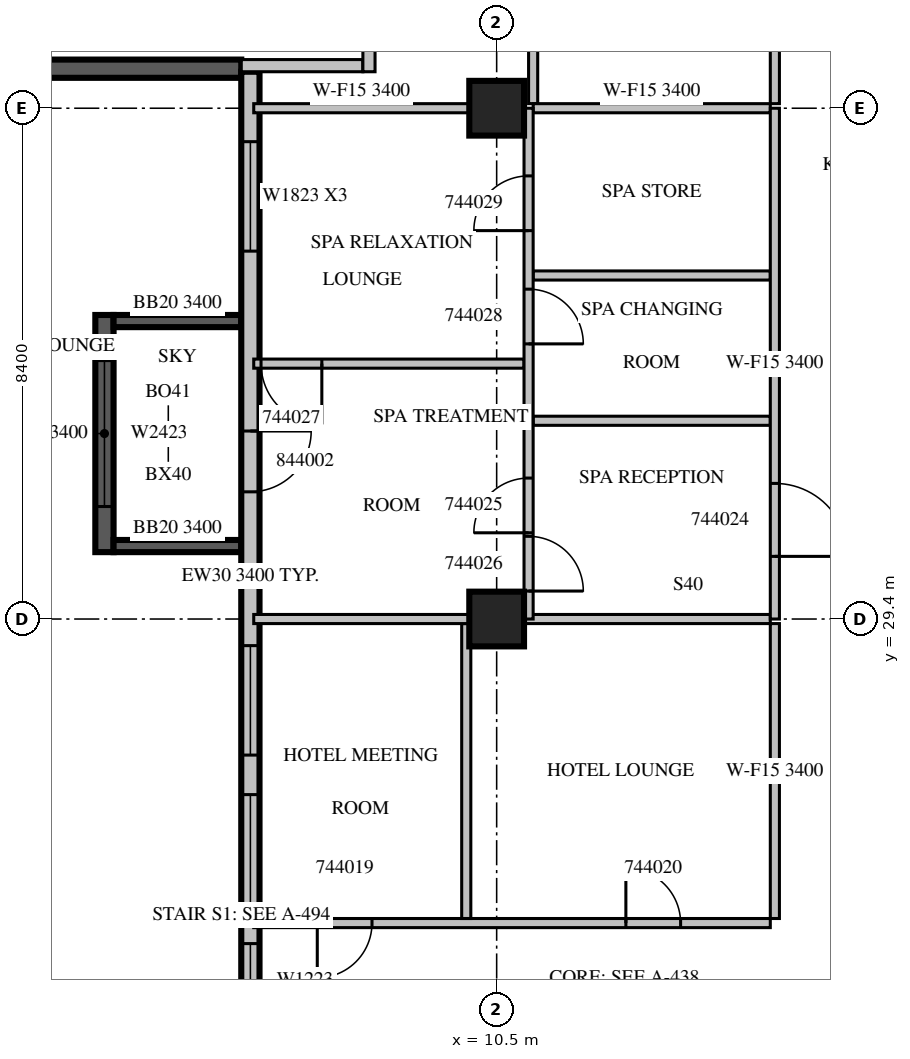
"""IFC4 building model, lengths in metres.
Left out: names, types, materials, properties, quantities, classifications, styles, units other than length and angle.
Written with IfcOpenShell. Run it as: python <this file> out.ifc"""

import sys

from ifc_helpers import new_model, si_unit, direction, frame, frame_2d, origin, origin_2d, place, context, subcontext, project, spatial, rectangle, extrude, source, transform, mapped, element, fill, save


model = new_model("IFC4")
c1 = context("Model", 3, precision=1e-05, world=origin(), true_north=direction((0.0, 1.0)))
c2 = subcontext(c1, "Body", "Model", "MODEL_VIEW")
j1 = project(units=[si_unit("LENGTHUNIT", "METRE"), si_unit("PLANEANGLEUNIT", "RADIAN")], contexts=[c1])
p1 = place(None, origin())
s1 = spatial("IfcSite", under=j1, at=p1, CompositionType="ELEMENT")
p2 = place(p1, origin())
s2 = spatial("IfcBuilding", under=s1, at=p2, CompositionType="ELEMENT")
p3 = place(p2, frame((0.0, 0.0, 200.6)))
s3 = spatial("IfcBuildingStorey", under=s2, at=p3, CompositionType="ELEMENT", Elevation=200.6)
m1 = source(origin(), c2, "Body", "SweptSolid", [
    extrude(rectangle(XDim=0.9, YDim=0.9, at=origin_2d()), origin(), (0.0, 0.0, 1.0), 3.8),
])
for number, where, z_axis, x_axis in (
    (1, (10.5, 29.4, 0.0), (0.0, 0.0, 1.0), (1.0, 0.0, 0.0)),
    (2, (10.5, 37.8, 0.0), (0.0, 0.0, 1.0), (1.0, 0.0, 0.0)),
):
    element("IfcColumn", number, at=place(p3, frame(where, z_axis=z_axis, x_axis=x_axis)), inside=s3, PredefinedType="COLUMN", context=c2, shape_type="MappedRepresentation", body=[
        mapped(m1, transform((0.0, 0.0, 0.0), scale=1.0)),
    ])
p4 = place(p3, frame((4.05, 34.4, 0.0), z_axis=(0.0, 0.0, 1.0), x_axis=(0.0, -1.0, 0.0)))
e3 = element("IfcWall", 3, at=p4, inside=s3, PredefinedType="SOLIDWALL", context=c2, shape_type="SweptSolid", body=[
    extrude(rectangle(XDim=3.9, YDim=0.3, at=frame_2d((1.95, 0.0))), origin(), (0.0, 0.0, 1.0), 3.4),
])
m2 = source(origin(), c2, "Body", "SweptSolid", [
    extrude(rectangle(XDim=2.4, YDim=2.3, at=frame_2d((1.2, 1.15))), frame((0.0, 0.16, 0.0), z_axis=(0.0, -1.0, 0.0), x_axis=(1.0, 0.0, 0.0)), (0.0, 0.0, 1.0), 0.32),
])
p5 = place(p4, frame((0.75, 0.0, 0.6)))
e4 = element("IfcOpeningElement", 4, at=p5, cuts=e3, PredefinedType="OPENING", context=c2, shape_type="MappedRepresentation", body=[
    mapped(m2, transform((0.0, 0.0, 0.0), scale=1.0)),
])
p6 = place(p3, frame((6.3, 34.3, 0.0), z_axis=(0.0, 0.0, 1.0), x_axis=(-1.0, 0.0, 0.0)))
e5 = element("IfcWall", 5, at=p6, inside=s3, PredefinedType="SOLIDWALL", context=c2, shape_type="SweptSolid", body=[
    extrude(rectangle(XDim=2.1, YDim=0.2, at=frame_2d((1.05, 0.0))), origin(), (0.0, 0.0, 1.0), 3.4),
])
m3 = source(origin(), c2, "Body", "SweptSolid", [
    extrude(rectangle(XDim=2.1, YDim=0.2, at=frame_2d((1.05, 0.0))), origin(), (0.0, 0.0, 1.0), 3.4),
])
p7 = place(p3, frame((6.3, 30.6, 0.0), z_axis=(0.0, 0.0, 1.0), x_axis=(-1.0, 0.0, 0.0)))
e6 = element("IfcWall", 6, at=p7, inside=s3, PredefinedType="SOLIDWALL", context=c2, shape_type="MappedRepresentation", body=[
    mapped(m3, transform((0.0, 0.0, 0.0), scale=1.0)),
])
m4 = source(origin(), c2, "Body", "SweptSolid", [
    extrude(rectangle(XDim=6.1, YDim=0.3, at=frame_2d((3.05, 0.0))), origin(), (0.0, 0.0, 1.0), 3.4),
])
p8 = place(p3, frame((0.2, 38.45, 0.0), z_axis=(0.0, 0.0, 1.0), x_axis=(1.0, 0.0, 0.0)))
e7 = element("IfcWall", 7, at=p8, inside=s3, PredefinedType="SOLIDWALL", context=c2, shape_type="MappedRepresentation", body=[
    mapped(m4, transform((0.0, 0.0, 0.0), scale=1.0)),
])
m5 = source(origin(), c2, "Body", "SweptSolid", [
    extrude(rectangle(XDim=16.6, YDim=0.3, at=frame_2d((8.3, 0.0))), origin(), (0.0, 0.0, 1.0), 3.4),
])
p9 = place(p3, frame((6.45, 38.4, 0.0), z_axis=(0.0, 0.0, 1.0), x_axis=(0.0, -1.0, 0.0)))
e8 = element("IfcWall", 8, at=p9, inside=s3, PredefinedType="STANDARD", context=c2, shape_type="MappedRepresentation", body=[
    mapped(m5, transform((0.0, 0.0, 0.0), scale=1.0)),
])
m6 = source(origin(), c2, "Body", "SweptSolid", [
    extrude(rectangle(XDim=1.8, YDim=2.3, at=frame_2d((0.9, 1.15))), frame((0.0, 0.16, 0.0), z_axis=(0.0, -1.0, 0.0), x_axis=(1.0, 0.0, 0.0)), (0.0, 0.0, 1.0), 0.32),
])
p10 = place(p9, frame((1.15, 0.0, 0.6)))
e9 = element("IfcOpeningElement", 9, at=p10, cuts=e8, PredefinedType="OPENING", context=c2, shape_type="MappedRepresentation", body=[
    mapped(m6, transform((0.0, 0.0, 0.0), scale=1.0)),
])
p11 = place(p9, frame((9.438, 0.0, 0.6)))
e10 = element("IfcOpeningElement", 10, at=p11, cuts=e8, PredefinedType="OPENING", context=c2, shape_type="MappedRepresentation", body=[
    mapped(m6, transform((0.0, 0.0, 0.0), scale=1.0)),
])
m7 = source(origin(), c2, "Body", "SweptSolid", [
    extrude(rectangle(XDim=1.2, YDim=2.3, at=frame_2d((0.6, 1.15))), frame((0.0, 0.16, 0.0), z_axis=(0.0, -1.0, 0.0), x_axis=(1.0, 0.0, 0.0)), (0.0, 0.0, 1.0), 0.32),
])
p12 = place(p9, frame((14.338, 0.0, 0.6)))
e11 = element("IfcOpeningElement", 11, at=p12, cuts=e8, PredefinedType="OPENING", context=c2, shape_type="MappedRepresentation", body=[
    mapped(m7, transform((0.0, 0.0, 0.0), scale=1.0)),
])
p13 = place(p9, frame((11.887, 0.0, 0.6)))
e12 = element("IfcOpeningElement", 12, at=p13, cuts=e8, PredefinedType="OPENING", context=c2, shape_type="MappedRepresentation", body=[
    mapped(m6, transform((0.0, 0.0, 0.0), scale=1.0)),
])
m8 = source(origin(), c2, "Body", "SweptSolid", [
    extrude(rectangle(XDim=1.0, YDim=2.1, at=frame_2d((0.5, 1.05))), frame((0.0, 0.16, 0.0), z_axis=(0.0, -1.0, 0.0), x_axis=(1.0, 0.0, 0.0)), (0.0, 0.0, 1.0), 0.32),
])
p14 = place(p9, frame((5.908, 0.0, 0.0)))
e13 = element("IfcOpeningElement", 13, at=p14, cuts=e8, PredefinedType="OPENING", context=c2, shape_type="MappedRepresentation", body=[
    mapped(m8, transform((0.0, 0.0, 0.0), scale=1.0)),
])
m9 = source(origin(), c2, "Body", "SweptSolid", [
    extrude(rectangle(XDim=2.0, YDim=0.2, at=frame_2d((1.0, 0.0))), origin(), (0.0, 0.0, 1.0), 3.4),
])
p15 = place(p3, frame((6.3, 38.5, 0.0), z_axis=(0.0, 0.0, 1.0), x_axis=(1.0, 0.0, 0.0)))
e14 = element("IfcWall", 14, at=p15, inside=s3, PredefinedType="PARTITIONING", context=c2, shape_type="MappedRepresentation", body=[
    mapped(m9, transform((0.0, 0.0, 0.0), scale=1.0)),
])
m10 = source(origin(), c2, "Body", "SweptSolid", [
    extrude(rectangle(XDim=5.45, YDim=0.2, at=frame_2d((2.725, 0.0))), origin(), (0.0, 0.0, 1.0), 3.4),
])
p16 = place(p3, frame((8.4, 38.4, 0.0), z_axis=(0.0, 0.0, 1.0), x_axis=(0.0, 1.0, 0.0)))
e15 = element("IfcWall", 15, at=p16, inside=s3, PredefinedType="PARTITIONING", context=c2, shape_type="MappedRepresentation", body=[
    mapped(m10, transform((0.0, 0.0, 0.0), scale=1.0)),
])
m11 = source(origin(), c2, "Body", "SweptSolid", [
    extrude(rectangle(XDim=1.2, YDim=2.1, at=frame_2d((0.6, 1.05))), frame((0.0, 0.11, 0.0), z_axis=(0.0, -1.0, 0.0), x_axis=(1.0, 0.0, 0.0)), (0.0, 0.0, 1.0), 0.22),
])
p17 = place(p16, frame((0.4, 0.0, 0.0)))
e16 = element("IfcOpeningElement", 16, at=p17, cuts=e15, PredefinedType="OPENING", context=c2, shape_type="MappedRepresentation", body=[
    mapped(m11, transform((0.0, 0.0, 0.0), scale=1.0)),
])
m12 = source(origin(), c2, "Body", "SweptSolid", [
    extrude(rectangle(XDim=0.9, YDim=2.1, at=frame_2d((0.45, 1.05))), frame((0.0, 0.11, 0.0), z_axis=(0.0, -1.0, 0.0), x_axis=(1.0, 0.0, 0.0)), (0.0, 0.0, 1.0), 0.22),
])
p18 = place(p16, frame((3.25, 0.0, 0.0)))
e17 = element("IfcOpeningElement", 17, at=p18, cuts=e15, PredefinedType="OPENING", context=c2, shape_type="MappedRepresentation", body=[
    mapped(m12, transform((0.0, 0.0, 0.0), scale=1.0)),
])
m13 = source(origin(), c2, "Body", "SweptSolid", [
    extrude(rectangle(XDim=8.495, YDim=0.15, at=frame_2d((4.247, 0.0))), origin(), (0.0, 0.0, 1.0), 3.4),
])
p19 = place(p3, frame((6.505, 24.4, 0.0), z_axis=(0.0, 0.0, 1.0), x_axis=(1.0, 0.0, 0.0)))
e18 = element("IfcWall", 18, at=p19, inside=s3, PredefinedType="PARTITIONING", context=c2, shape_type="MappedRepresentation", body=[
    mapped(m13, transform((0.0, 0.0, 0.0), scale=1.0)),
])
m14 = source(origin(), c2, "Body", "SweptSolid", [
    extrude(rectangle(XDim=0.9, YDim=2.1, at=frame_2d((0.45, 1.05))), frame((0.0, 0.085, 0.0), z_axis=(0.0, -1.0, 0.0), x_axis=(1.0, 0.0, 0.0)), (0.0, 0.0, 1.0), 0.17),
])
p20 = place(p19, frame((1.045, 0.0, 0.0)))
e19 = element("IfcOpeningElement", 19, at=p20, cuts=e18, PredefinedType="OPENING", context=c2, shape_type="MappedRepresentation", body=[
    mapped(m14, transform((0.0, 0.0, 0.0), scale=1.0)),
])
p21 = place(p19, frame((6.12, 0.0, 0.0)))
e20 = element("IfcOpeningElement", 20, at=p21, cuts=e18, PredefinedType="OPENING", context=c2, shape_type="MappedRepresentation", body=[
    mapped(m14, transform((0.0, 0.0, 0.0), scale=1.0)),
])
m15 = source(origin(), c2, "Body", "SweptSolid", [
    extrude(rectangle(XDim=4.85, YDim=0.15, at=frame_2d((2.425, 0.0))), origin(), (0.0, 0.0, 1.0), 3.4),
])
for number, where, z_axis, x_axis in (
    (21, (10.0, 24.475, 0.0), (0.0, 0.0, 1.0), (0.0, 1.0, 0.0)),
    (22, (15.075, 24.475, 0.0), (0.0, 0.0, 1.0), (0.0, 1.0, 0.0)),
):
    element("IfcWall", number, at=place(p3, frame(where, z_axis=z_axis, x_axis=x_axis)), inside=s3, PredefinedType="PARTITIONING", context=c2, shape_type="MappedRepresentation", body=[
        mapped(m15, transform((0.0, 0.0, 0.0), scale=1.0)),
    ])
m16 = source(origin(), c2, "Body", "SweptSolid", [
    extrude(rectangle(XDim=3.546, YDim=0.15, at=frame_2d((1.773, 0.0))), origin(), (0.0, 0.0, 1.0), 3.4),
])
p22 = place(p3, frame((10.051, 29.4, 0.0), z_axis=(0.0, 0.0, 1.0), x_axis=(-1.0, 0.0, 0.0)))
e23 = element("IfcWall", 23, at=p22, inside=s3, PredefinedType="PARTITIONING", context=c2, shape_type="MappedRepresentation", body=[
    mapped(m16, transform((0.0, 0.0, 0.0), scale=1.0)),
])
m17 = source(origin(), c2, "Body", "SweptSolid", [
    extrude(rectangle(XDim=4.051, YDim=0.15, at=frame_2d((2.026, 0.0))), origin(), (0.0, 0.0, 1.0), 3.4),
])
p23 = place(p3, frame((15.0, 29.4, 0.0), z_axis=(0.0, 0.0, 1.0), x_axis=(-1.0, 0.0, 0.0)))
e24 = element("IfcWall", 24, at=p23, inside=s3, PredefinedType="PARTITIONING", context=c2, shape_type="MappedRepresentation", body=[
    mapped(m17, transform((0.0, 0.0, 0.0), scale=1.0)),
])
m18 = source(origin(), c2, "Body", "SweptSolid", [
    extrude(rectangle(XDim=6.45, YDim=0.15, at=frame_2d((3.225, 0.0))), origin(), (0.0, 0.0, 1.0), 3.4),
])
p24 = place(p3, frame((11.1, 44.325, 0.0), z_axis=(0.0, 0.0, 1.0), x_axis=(0.0, -1.0, 0.0)))
e25 = element("IfcWall", 25, at=p24, inside=s3, PredefinedType="PARTITIONING", context=c2, shape_type="MappedRepresentation", body=[
    mapped(m18, transform((0.0, 0.0, 0.0), scale=1.0)),
])
p25 = place(p3, frame((15.075, 37.875, 0.0), z_axis=(0.0, 0.0, 1.0), x_axis=(0.0, 1.0, 0.0)))
e26 = element("IfcWall", 26, at=p25, inside=s3, PredefinedType="PARTITIONING", context=c2, shape_type="MappedRepresentation", body=[
    mapped(m18, transform((0.0, 0.0, 0.0), scale=1.0)),
])
p26 = place(p25, frame((2.737, 0.0, 0.0)))
e27 = element("IfcOpeningElement", 27, at=p26, cuts=e26, PredefinedType="OPENING", context=c2, shape_type="MappedRepresentation", body=[
    mapped(m14, transform((0.0, 0.0, 0.0), scale=1.0)),
])
m19 = source(origin(), c2, "Body", "SweptSolid", [
    extrude(rectangle(XDim=4.445, YDim=0.15, at=frame_2d((2.223, 0.0))), origin(), (0.0, 0.0, 1.0), 3.4),
])
p27 = place(p3, frame((10.95, 33.6, 0.0), z_axis=(0.0, 0.0, 1.0), x_axis=(-1.0, 0.0, 0.0)))
e28 = element("IfcWall", 28, at=p27, inside=s3, PredefinedType="PARTITIONING", context=c2, shape_type="MappedRepresentation", body=[
    mapped(m19, transform((0.0, 0.0, 0.0), scale=1.0)),
])
m20 = source(origin(), c2, "Body", "SweptSolid", [
    extrude(rectangle(XDim=1.0, YDim=2.1, at=frame_2d((0.5, 1.05))), frame((0.0, 0.085, 0.0), z_axis=(0.0, -1.0, 0.0), x_axis=(1.0, 0.0, 0.0)), (0.0, 0.0, 1.0), 0.17),
])
p28 = place(p27, frame((3.325, 0.0, 0.0)))
e29 = element("IfcOpeningElement", 29, at=p28, cuts=e28, PredefinedType="OPENING", context=c2, shape_type="MappedRepresentation", body=[
    mapped(m20, transform((0.0, 0.0, 0.0), scale=1.0)),
])
m21 = source(origin(), c2, "Body", "SweptSolid", [
    extrude(rectangle(XDim=3.9, YDim=0.15, at=frame_2d((1.95, 0.0))), origin(), (0.0, 0.0, 1.0), 3.4),
])
for number, where, z_axis, x_axis in (
    (30, (15.0, 32.66, 0.0), (0.0, 0.0, 1.0), (-1.0, 0.0, 0.0)),
    (31, (15.0, 35.049, 0.0), (0.0, 0.0, 1.0), (-1.0, 0.0, 0.0)),
):
    element("IfcWall", number, at=place(p3, frame(where, z_axis=z_axis, x_axis=x_axis)), inside=s3, PredefinedType="PARTITIONING", context=c2, shape_type="MappedRepresentation", body=[
        mapped(m21, transform((0.0, 0.0, 0.0), scale=1.0)),
    ])
p29 = place(p3, frame((10.051, 37.8, 0.0), z_axis=(0.0, 0.0, 1.0), x_axis=(-1.0, 0.0, 0.0)))
e32 = element("IfcWall", 32, at=p29, inside=s3, PredefinedType="PARTITIONING", context=c2, shape_type="MappedRepresentation", body=[
    mapped(m16, transform((0.0, 0.0, 0.0), scale=1.0)),
])
p30 = place(p3, frame((15.0, 37.8, 0.0), z_axis=(0.0, 0.0, 1.0), x_axis=(-1.0, 0.0, 0.0)))
e33 = element("IfcWall", 33, at=p30, inside=s3, PredefinedType="PARTITIONING", context=c2, shape_type="MappedRepresentation", body=[
    mapped(m21, transform((0.0, 0.0, 0.0), scale=1.0)),
])
m22 = source(origin(), c2, "Body", "SweptSolid", [
    extrude(rectangle(XDim=8.4, YDim=0.15, at=frame_2d((4.2, 0.0))), origin(), (0.0, 0.0, 1.0), 3.4),
])
p31 = place(p3, frame((11.025, 29.4, 0.0), z_axis=(0.0, 0.0, 1.0), x_axis=(0.0, 1.0, 0.0)))
e34 = element("IfcWall", 34, at=p31, inside=s3, PredefinedType="PARTITIONING", context=c2, shape_type="MappedRepresentation", body=[
    mapped(m22, transform((0.0, 0.0, 0.0), scale=1.0)),
])
p32 = place(p31, frame((1.418, 0.0, 0.0)))
e35 = element("IfcOpeningElement", 35, at=p32, cuts=e34, PredefinedType="OPENING", context=c2, shape_type="MappedRepresentation", body=[
    mapped(m14, transform((0.0, 0.0, 0.0), scale=1.0)),
])
p33 = place(p31, frame((0.46, 0.0, 0.0)))
e36 = element("IfcOpeningElement", 36, at=p33, cuts=e34, PredefinedType="OPENING", context=c2, shape_type="MappedRepresentation", body=[
    mapped(m14, transform((0.0, 0.0, 0.0), scale=1.0)),
])
p34 = place(p31, frame((4.525, 0.0, 0.0)))
e37 = element("IfcOpeningElement", 37, at=p34, cuts=e34, PredefinedType="OPENING", context=c2, shape_type="MappedRepresentation", body=[
    mapped(m14, transform((0.0, 0.0, 0.0), scale=1.0)),
])
p35 = place(p31, frame((6.387, 0.0, 0.0)))
e38 = element("IfcOpeningElement", 38, at=p35, cuts=e34, PredefinedType="OPENING", context=c2, shape_type="MappedRepresentation", body=[
    mapped(m14, transform((0.0, 0.0, 0.0), scale=1.0)),
])
p36 = place(p3, frame((15.075, 29.4, 0.0), z_axis=(0.0, 0.0, 1.0), x_axis=(0.0, 1.0, 0.0)))
e39 = element("IfcWall", 39, at=p36, inside=s3, PredefinedType="PARTITIONING", context=c2, shape_type="MappedRepresentation", body=[
    mapped(m22, transform((0.0, 0.0, 0.0), scale=1.0)),
])
m23 = source(origin(), c2, "Body", "SweptSolid", [
    extrude(rectangle(XDim=1.2, YDim=2.1, at=frame_2d((0.6, 1.05))), frame((0.0, 0.085, 0.0), z_axis=(0.0, -1.0, 0.0), x_axis=(1.0, 0.0, 0.0)), (0.0, 0.0, 1.0), 0.17),
])
p37 = place(p36, frame((1.03, 0.0, 0.0)))
e40 = element("IfcOpeningElement", 40, at=p37, cuts=e39, PredefinedType="OPENING", context=c2, shape_type="MappedRepresentation", body=[
    mapped(m23, transform((0.0, 0.0, 0.0), scale=1.0)),
])
m24 = source(origin(), c2, "Body", "SweptSolid", [
    extrude(rectangle(XDim=2.4, YDim=2.3, at=frame_2d((1.2, 1.15))), frame((0.0, 0.03, 0.0), z_axis=(0.0, -1.0, 0.0), x_axis=(1.0, 0.0, 0.0)), (0.0, 0.0, 1.0), 0.06),
])
p38 = place(p5, origin())
e41 = element("IfcWindow", 41, at=p38, inside=s3, PartitioningType="SINGLE_PANEL", PredefinedType="WINDOW", context=c2, shape_type="MappedRepresentation", body=[
    mapped(m24, transform((0.0, 0.0, 0.0), scale=1.0)),
])
fill(e4, e41)
m25 = source(origin(), c2, "Body", "SweptSolid", [
    extrude(rectangle(XDim=1.8, YDim=2.3, at=frame_2d((0.9, 1.15))), frame((0.0, 0.03, 0.0), z_axis=(0.0, -1.0, 0.0), x_axis=(1.0, 0.0, 0.0)), (0.0, 0.0, 1.0), 0.06),
])
p39 = place(p10, origin())
e42 = element("IfcWindow", 42, at=p39, inside=s3, PartitioningType="SINGLE_PANEL", PredefinedType="WINDOW", context=c2, shape_type="MappedRepresentation", body=[
    mapped(m25, transform((0.0, 0.0, 0.0), scale=1.0)),
])
fill(e9, e42)
p40 = place(p11, origin())
e43 = element("IfcWindow", 43, at=p40, inside=s3, PartitioningType="SINGLE_PANEL", PredefinedType="WINDOW", context=c2, shape_type="MappedRepresentation", body=[
    mapped(m25, transform((0.0, 0.0, 0.0), scale=1.0)),
])
fill(e10, e43)
m26 = source(origin(), c2, "Body", "SweptSolid", [
    extrude(rectangle(XDim=1.2, YDim=2.3, at=frame_2d((0.6, 1.15))), frame((0.0, 0.03, 0.0), z_axis=(0.0, -1.0, 0.0), x_axis=(1.0, 0.0, 0.0)), (0.0, 0.0, 1.0), 0.06),
])
p41 = place(p12, origin())
e44 = element("IfcWindow", 44, at=p41, inside=s3, PartitioningType="SINGLE_PANEL", PredefinedType="WINDOW", context=c2, shape_type="MappedRepresentation", body=[
    mapped(m26, transform((0.0, 0.0, 0.0), scale=1.0)),
])
fill(e11, e44)
p42 = place(p13, origin())
e45 = element("IfcWindow", 45, at=p42, inside=s3, PartitioningType="SINGLE_PANEL", PredefinedType="WINDOW", context=c2, shape_type="MappedRepresentation", body=[
    mapped(m25, transform((0.0, 0.0, 0.0), scale=1.0)),
])
fill(e12, e45)
m27 = source(origin(), c2, "Body", "SweptSolid", [
    extrude(rectangle(XDim=0.9, YDim=2.1, at=frame_2d((0.45, 1.05))), frame((0.0, 0.025, 0.0), z_axis=(0.0, -1.0, 0.0), x_axis=(1.0, 0.0, 0.0)), (0.0, 0.0, 1.0), 0.05),
])
p43 = place(p20, origin())
e46 = element("IfcDoor", 46, at=p43, inside=s3, OperationType="SINGLE_SWING_RIGHT", PredefinedType="DOOR", context=c2, shape_type="MappedRepresentation", body=[
    mapped(m27, transform((0.0, 0.0, 0.0), scale=1.0)),
])
fill(e19, e46)
p44 = place(p21, origin())
e47 = element("IfcDoor", 47, at=p44, inside=s3, OperationType="SINGLE_SWING_LEFT", PredefinedType="DOOR", context=c2, shape_type="MappedRepresentation", body=[
    mapped(m27, transform((0.0, 0.0, 0.0), scale=1.0)),
])
fill(e20, e47)
m28 = source(origin(), c2, "Body", "SweptSolid", [
    extrude(rectangle(XDim=1.2, YDim=2.1, at=frame_2d((0.6, 1.05))), frame((0.0, 0.025, 0.0), z_axis=(0.0, -1.0, 0.0), x_axis=(1.0, 0.0, 0.0)), (0.0, 0.0, 1.0), 0.05),
])
p45 = place(p37, origin())
e48 = element("IfcDoor", 48, at=p45, inside=s3, OperationType="SINGLE_SWING_RIGHT", PredefinedType="DOOR", context=c2, shape_type="MappedRepresentation", body=[
    mapped(m28, transform((0.0, 0.0, 0.0), scale=1.0)),
])
fill(e40, e48)
p46 = place(p32, origin())
e49 = element("IfcDoor", 49, at=p46, inside=s3, OperationType="SINGLE_SWING_LEFT", PredefinedType="DOOR", context=c2, shape_type="MappedRepresentation", body=[
    mapped(m27, transform((0.0, 0.0, 0.0), scale=1.0)),
])
fill(e35, e49)
p47 = place(p33, origin())
e50 = element("IfcDoor", 50, at=p47, inside=s3, OperationType="SINGLE_SWING_RIGHT", PredefinedType="DOOR", context=c2, shape_type="MappedRepresentation", body=[
    mapped(m27, transform((0.0, 0.0, 0.0), scale=1.0)),
])
fill(e36, e50)
m29 = source(origin(), c2, "Body", "SweptSolid", [
    extrude(rectangle(XDim=1.0, YDim=2.1, at=frame_2d((0.5, 1.05))), frame((0.0, 0.025, 0.0), z_axis=(0.0, -1.0, 0.0), x_axis=(1.0, 0.0, 0.0)), (0.0, 0.0, 1.0), 0.05),
])
p48 = place(p28, origin())
e51 = element("IfcDoor", 51, at=p48, inside=s3, OperationType="SINGLE_SWING_LEFT", PredefinedType="DOOR", context=c2, shape_type="MappedRepresentation", body=[
    mapped(m29, transform((0.0, 0.0, 0.0), scale=1.0)),
])
fill(e29, e51)
p49 = place(p34, origin())
e52 = element("IfcDoor", 52, at=p49, inside=s3, OperationType="SINGLE_SWING_RIGHT", PredefinedType="DOOR", context=c2, shape_type="MappedRepresentation", body=[
    mapped(m27, transform((0.0, 0.0, 0.0), scale=1.0)),
])
fill(e37, e52)
p50 = place(p35, origin())
e53 = element("IfcDoor", 53, at=p50, inside=s3, OperationType="SINGLE_SWING_LEFT", PredefinedType="DOOR", context=c2, shape_type="MappedRepresentation", body=[
    mapped(m27, transform((0.0, 0.0, 0.0), scale=1.0)),
])
fill(e38, e53)
p51 = place(p14, origin())
e54 = element("IfcDoor", 54, at=p51, inside=s3, OperationType="SINGLE_SWING_LEFT", PredefinedType="DOOR", context=c2, shape_type="MappedRepresentation", body=[
    mapped(m29, transform((0.0, 0.0, 0.0), scale=1.0)),
])
fill(e13, e54)
save(model, sys.argv[1])
